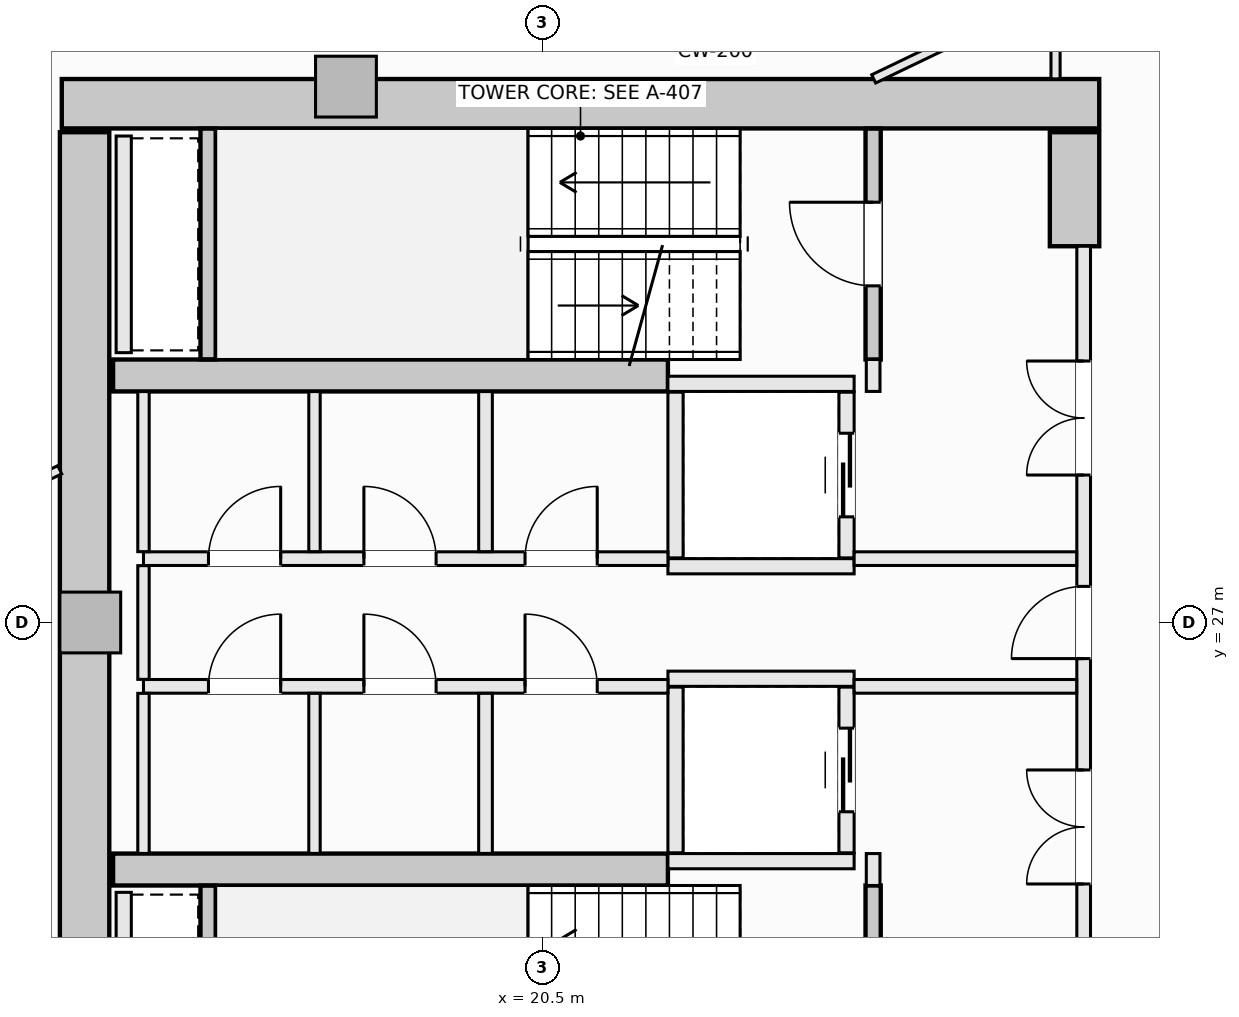
"""IFC4 building model, lengths in metres.
Left out: names, types, materials, properties, quantities, classifications, styles, units other than length and angle.
Written with IfcOpenShell. Run it as: python <this file> out.ifc"""

import sys

from ifc_helpers import new_model, si_unit, direction, frame, frame_2d, origin, origin_2d, place, context, subcontext, project, spatial, rectangle, extrude, element, fill, save


model = new_model("IFC4")
c1 = context("Model", 3, precision=1e-05, world=origin(), true_north=direction((0.0, 1.0)))
c2 = subcontext(c1, "Body", "Model", "MODEL_VIEW")
j1 = project(units=[si_unit("LENGTHUNIT", "METRE"), si_unit("PLANEANGLEUNIT", "RADIAN")], contexts=[c1])
p1 = place(None, origin())
s1 = spatial("IfcSite", under=j1, at=p1, CompositionType="ELEMENT")
p2 = place(p1, origin())
s2 = spatial("IfcBuilding", under=s1, at=p2, CompositionType="ELEMENT")
p3 = place(p2, frame((0.0, 0.0, 122.3)))
s3 = spatial("IfcBuildingStorey", under=s2, at=p3, CompositionType="ELEMENT", Elevation=122.3)
p4 = place(p3, frame((14.175, 33.825, -0.27), z_axis=(0.0, 0.0, 1.0), x_axis=(1.0, 0.0, 0.0)))
e1 = element("IfcWall", 1, at=p4, inside=s3, PredefinedType="SHEAR", context=c2, shape_type="SweptSolid", body=[
    extrude(rectangle(XDim=13.65, YDim=0.65, at=frame_2d((6.825, 0.0))), origin(), (0.0, 0.0, 1.0), 3.4),
])
p5 = place(p3, frame((14.475, 20.55, -0.27), z_axis=(0.0, 0.0, 1.0), x_axis=(0.0, 1.0, 0.0)))
e2 = element("IfcWall", 2, at=p5, inside=s3, PredefinedType="SHEAR", context=c2, shape_type="SweptSolid", body=[
    extrude(rectangle(XDim=12.9, YDim=0.65, at=frame_2d((6.45, 0.0))), origin(), (0.0, 0.0, 1.0), 3.4),
])
p6 = place(p3, frame((27.5, 31.95, -0.27), z_axis=(0.0, 0.0, 1.0), x_axis=(0.0, 1.0, 0.0)))
e3 = element("IfcWall", 3, at=p6, inside=s3, PredefinedType="SHEAR", context=c2, shape_type="SweptSolid", body=[
    extrude(rectangle(XDim=1.5, YDim=0.65, at=frame_2d((0.75, 0.0))), origin(), (0.0, 0.0, 1.0), 3.4),
])
for number, where, z_axis, x_axis in (
    (4, (14.85, 30.25, -0.27), (0.0, 0.0, 1.0), (1.0, 0.0, 0.0)),
    (5, (14.85, 23.75, -0.27), (0.0, 0.0, 1.0), (1.0, 0.0, 0.0)),
):
    element("IfcWall", number, at=place(p3, frame(where, z_axis=z_axis, x_axis=x_axis)), inside=s3, PredefinedType="SHEAR", context=c2, shape_type="SweptSolid", body=[
        extrude(rectangle(XDim=7.3, YDim=0.42, at=frame_2d((3.65, 0.0))), origin(), (0.0, 0.0, 1.0), 3.4),
    ])
for number, where, z_axis, x_axis in (
    (6, (17.914, 34.05, -0.27), (0.0, 0.0, 1.0), (1.0, 0.0, 0.0)),
    (7, (14.55, 27.0, -0.27), (0.0, 0.0, 1.0), (1.0, 0.0, 0.0)),
):
    element("IfcColumn", number, at=place(p3, frame(where, z_axis=z_axis, x_axis=x_axis)), inside=s3, PredefinedType="PILASTER", context=c2, shape_type="SweptSolid", body=[
        extrude(rectangle(XDim=0.8, YDim=0.8, at=origin_2d()), origin(), (0.0, 0.0, 1.0), 3.4),
    ])
p7 = place(p3, frame((24.85, 30.46, -0.27), z_axis=(0.0, 0.0, 1.0), x_axis=(0.0, 1.0, 0.0)))
e8 = element("IfcWall", 8, at=p7, inside=s3, PredefinedType="SHEAR", context=c2, shape_type="SweptSolid", body=[
    extrude(rectangle(XDim=3.038, YDim=0.2, at=frame_2d((1.519, 0.0))), origin(), (0.0, 0.0, 1.0), 3.4),
])
p8 = place(p7, frame((0.969, 0.0, 0.27)))
e9 = element("IfcOpeningElement", 9, at=p8, cuts=e8, PredefinedType="OPENING", context=c2, shape_type="SweptSolid", body=[
    extrude(rectangle(XDim=1.1, YDim=2.15, at=frame_2d((0.55, 1.075))), frame((0.0, 0.11, 0.0), z_axis=(0.0, -1.0, 0.0), x_axis=(1.0, 0.0, 0.0)), (0.0, 0.0, 1.0), 0.22),
])
p9 = place(p3, frame((16.1, 30.462, -0.27), z_axis=(0.0, 0.0, 1.0), x_axis=(0.0, 1.0, 0.0)))
e10 = element("IfcWall", 10, at=p9, inside=s3, PredefinedType="SHEAR", context=c2, shape_type="SweptSolid", body=[
    extrude(rectangle(XDim=3.036, YDim=0.2, at=frame_2d((1.518, 0.0))), origin(), (0.0, 0.0, 1.0), 3.4),
])
p10 = place(p3, frame((24.85, 20.502, -0.27), z_axis=(0.0, 0.0, 1.0), x_axis=(0.0, 1.0, 0.0)))
e11 = element("IfcWall", 11, at=p10, inside=s3, PredefinedType="SHEAR", context=c2, shape_type="SweptSolid", body=[
    extrude(rectangle(XDim=3.038, YDim=0.2, at=frame_2d((1.519, 0.0))), origin(), (0.0, 0.0, 1.0), 3.4),
])
p11 = place(p10, frame((0.969, 0.0, 0.27)))
e12 = element("IfcOpeningElement", 12, at=p11, cuts=e11, PredefinedType="OPENING", context=c2, shape_type="SweptSolid", body=[
    extrude(rectangle(XDim=1.1, YDim=2.15, at=frame_2d((0.55, 1.075))), frame((0.0, 0.11, 0.0), z_axis=(0.0, -1.0, 0.0), x_axis=(1.0, 0.0, 0.0)), (0.0, 0.0, 1.0), 0.22),
])
p12 = place(p3, frame((16.1, 20.502, -0.27), z_axis=(0.0, 0.0, 1.0), x_axis=(0.0, 1.0, 0.0)))
e13 = element("IfcWall", 13, at=p12, inside=s3, PredefinedType="SHEAR", context=c2, shape_type="SweptSolid", body=[
    extrude(rectangle(XDim=3.036, YDim=0.2, at=frame_2d((1.518, 0.0))), origin(), (0.0, 0.0, 1.0), 3.4),
])
for number, where, z_axis, x_axis in (
    (14, (22.15, 30.14, 0.0), (0.0, 0.0, 1.0), (1.0, 0.0, 0.0)),
    (15, (22.15, 27.74, 0.0), (0.0, 0.0, 1.0), (1.0, 0.0, 0.0)),
):
    element("IfcWall", number, at=place(p3, frame(where, z_axis=z_axis, x_axis=x_axis)), inside=s3, PredefinedType="SOLIDWALL", context=c2, shape_type="SweptSolid", body=[
        extrude(rectangle(XDim=2.45, YDim=0.2, at=frame_2d((1.225, 0.0))), origin(), (0.0, 0.0, 1.0), 3.13),
    ])
p13 = place(p3, frame((22.25, 27.85, 0.0), z_axis=(0.0, 0.0, 1.0), x_axis=(0.0, 1.0, 0.0)))
e16 = element("IfcWall", 16, at=p13, inside=s3, PredefinedType="SOLIDWALL", context=c2, shape_type="SweptSolid", body=[
    extrude(rectangle(XDim=2.18, YDim=0.2, at=frame_2d((1.09, 0.0))), origin(), (0.0, 0.0, 1.0), 3.13),
])
p14 = place(p3, frame((24.5, 27.85, 0.0), z_axis=(0.0, 0.0, 1.0), x_axis=(0.0, 1.0, 0.0)))
e17 = element("IfcWall", 17, at=p14, inside=s3, PredefinedType="SOLIDWALL", context=c2, shape_type="SweptSolid", body=[
    extrude(rectangle(XDim=2.18, YDim=0.2, at=frame_2d((1.09, 0.0))), origin(), (0.0, 0.0, 1.0), 3.13),
])
p15 = place(p14, frame((0.54, 0.0, 0.0)))
e18 = element("IfcOpeningElement", 18, at=p15, cuts=e17, PredefinedType="OPENING", context=c2, shape_type="SweptSolid", body=[
    extrude(rectangle(XDim=1.1, YDim=2.2, at=frame_2d((0.55, 1.1))), frame((0.0, 0.11, 0.0), z_axis=(0.0, -1.0, 0.0), x_axis=(1.0, 0.0, 0.0)), (0.0, 0.0, 1.0), 0.22),
])
for number, where, z_axis, x_axis in (
    (19, (22.15, 26.26, 0.0), (0.0, 0.0, 1.0), (1.0, 0.0, 0.0)),
    (20, (22.15, 23.86, 0.0), (0.0, 0.0, 1.0), (1.0, 0.0, 0.0)),
):
    element("IfcWall", number, at=place(p3, frame(where, z_axis=z_axis, x_axis=x_axis)), inside=s3, PredefinedType="SOLIDWALL", context=c2, shape_type="SweptSolid", body=[
        extrude(rectangle(XDim=2.45, YDim=0.2, at=frame_2d((1.225, 0.0))), origin(), (0.0, 0.0, 1.0), 3.13),
    ])
p16 = place(p3, frame((22.25, 23.97, 0.0), z_axis=(0.0, 0.0, 1.0), x_axis=(0.0, 1.0, 0.0)))
e21 = element("IfcWall", 21, at=p16, inside=s3, PredefinedType="SOLIDWALL", context=c2, shape_type="SweptSolid", body=[
    extrude(rectangle(XDim=2.18, YDim=0.2, at=frame_2d((1.09, 0.0))), origin(), (0.0, 0.0, 1.0), 3.13),
])
p17 = place(p3, frame((24.5, 23.97, 0.0), z_axis=(0.0, 0.0, 1.0), x_axis=(0.0, 1.0, 0.0)))
e22 = element("IfcWall", 22, at=p17, inside=s3, PredefinedType="SOLIDWALL", context=c2, shape_type="SweptSolid", body=[
    extrude(rectangle(XDim=2.18, YDim=0.2, at=frame_2d((1.09, 0.0))), origin(), (0.0, 0.0, 1.0), 3.13),
])
p18 = place(p17, frame((0.54, 0.0, 0.0)))
e23 = element("IfcOpeningElement", 23, at=p18, cuts=e22, PredefinedType="OPENING", context=c2, shape_type="SweptSolid", body=[
    extrude(rectangle(XDim=1.1, YDim=2.2, at=frame_2d((0.55, 1.1))), frame((0.0, 0.11, 0.0), z_axis=(0.0, -1.0, 0.0), x_axis=(1.0, 0.0, 0.0)), (0.0, 0.0, 1.0), 0.22),
])
for number, where, z_axis, x_axis in (
    (24, (14.99, 30.55, 0.0), (0.0, 0.0, 1.0), (0.0, 1.0, 0.0)),
    (25, (14.99, 20.6, 0.0), (0.0, 0.0, 1.0), (0.0, 1.0, 0.0)),
):
    element("IfcWall", number, at=place(p3, frame(where, z_axis=z_axis, x_axis=x_axis)), inside=s3, PredefinedType="SOLIDWALL", context=c2, shape_type="SweptSolid", body=[
        extrude(rectangle(XDim=2.85, YDim=0.2, at=frame_2d((1.425, 0.0))), origin(), (0.0, 0.0, 1.0), 3.13),
    ])
for number, where, z_axis, x_axis in (
    (26, (24.85, 23.54, 0.0), (0.0, 0.0, 1.0), (0.0, 1.0, 0.0)),
    (27, (24.85, 30.04, 0.0), (0.0, 0.0, 1.0), (0.0, 1.0, 0.0)),
):
    element("IfcWall", number, at=place(p3, frame(where, z_axis=z_axis, x_axis=x_axis)), inside=s3, PredefinedType="SOLIDWALL", context=c2, shape_type="SweptSolid", body=[
        extrude(rectangle(XDim=0.42, YDim=0.18, at=frame_2d((0.21, 0.0))), origin(), (0.0, 0.0, 1.0), 3.13),
    ])
p19 = place(p3, frame((27.62, 22.05, 0.0), z_axis=(0.0, 0.0, 1.0), x_axis=(0.0, 1.0, 0.0)))
e28 = element("IfcWall", 28, at=p19, inside=s3, PredefinedType="SOLIDWALL", context=c2, shape_type="SweptSolid", body=[
    extrude(rectangle(XDim=9.9, YDim=0.18, at=frame_2d((4.95, 0.0))), origin(), (0.0, 0.0, 1.0), 3.13),
])
p20 = place(p19, frame((4.475, 0.0, 0.0)))
e29 = element("IfcOpeningElement", 29, at=p20, cuts=e28, PredefinedType="OPENING", context=c2, shape_type="SweptSolid", body=[
    extrude(rectangle(XDim=0.95, YDim=2.1, at=frame_2d((0.475, 1.05))), frame((0.0, 0.1, 0.0), z_axis=(0.0, -1.0, 0.0), x_axis=(1.0, 0.0, 0.0)), (0.0, 0.0, 1.0), 0.2),
])
p21 = place(p19, frame((6.89, 0.0, 0.0)))
e30 = element("IfcOpeningElement", 30, at=p21, cuts=e28, PredefinedType="OPENING", context=c2, shape_type="SweptSolid", body=[
    extrude(rectangle(XDim=1.5, YDim=2.2, at=frame_2d((0.75, 1.1))), frame((0.0, 0.1, 0.0), z_axis=(0.0, -1.0, 0.0), x_axis=(1.0, 0.0, 0.0)), (0.0, 0.0, 1.0), 0.2),
])
p22 = place(p19, frame((1.51, 0.0, 0.0)))
e31 = element("IfcOpeningElement", 31, at=p22, cuts=e28, PredefinedType="OPENING", context=c2, shape_type="SweptSolid", body=[
    extrude(rectangle(XDim=1.5, YDim=2.2, at=frame_2d((0.75, 1.1))), frame((0.0, 0.1, 0.0), z_axis=(0.0, -1.0, 0.0), x_axis=(1.0, 0.0, 0.0)), (0.0, 0.0, 1.0), 0.2),
])
p23 = place(p3, frame((15.25, 27.84, 0.0), z_axis=(0.0, 0.0, 1.0), x_axis=(1.0, 0.0, 0.0)))
e32 = element("IfcWall", 32, at=p23, inside=s3, PredefinedType="SOLIDWALL", context=c2, shape_type="SweptSolid", body=[
    extrude(rectangle(XDim=6.9, YDim=0.18, at=frame_2d((3.45, 0.0))), origin(), (0.0, 0.0, 1.0), 3.13),
])
p24 = place(p23, frame((5.02, 0.0, 0.0)))
e33 = element("IfcOpeningElement", 33, at=p24, cuts=e32, PredefinedType="OPENING", context=c2, shape_type="SweptSolid", body=[
    extrude(rectangle(XDim=0.95, YDim=2.1, at=frame_2d((0.475, 1.05))), frame((0.0, 0.1, 0.0), z_axis=(0.0, -1.0, 0.0), x_axis=(1.0, 0.0, 0.0)), (0.0, 0.0, 1.0), 0.2),
])
p25 = place(p23, frame((0.855, 0.0, 0.0)))
e34 = element("IfcOpeningElement", 34, at=p25, cuts=e32, PredefinedType="OPENING", context=c2, shape_type="SweptSolid", body=[
    extrude(rectangle(XDim=0.95, YDim=2.1, at=frame_2d((0.475, 1.05))), frame((0.0, 0.1, 0.0), z_axis=(0.0, -1.0, 0.0), x_axis=(1.0, 0.0, 0.0)), (0.0, 0.0, 1.0), 0.2),
])
p26 = place(p23, frame((2.9, 0.0, 0.0)))
e35 = element("IfcOpeningElement", 35, at=p26, cuts=e32, PredefinedType="OPENING", context=c2, shape_type="SweptSolid", body=[
    extrude(rectangle(XDim=0.95, YDim=2.1, at=frame_2d((0.475, 1.05))), frame((0.0, 0.1, 0.0), z_axis=(0.0, -1.0, 0.0), x_axis=(1.0, 0.0, 0.0)), (0.0, 0.0, 1.0), 0.2),
])
p27 = place(p3, frame((24.6, 27.84, 0.0), z_axis=(0.0, 0.0, 1.0), x_axis=(1.0, 0.0, 0.0)))
e36 = element("IfcWall", 36, at=p27, inside=s3, PredefinedType="SOLIDWALL", context=c2, shape_type="SweptSolid", body=[
    extrude(rectangle(XDim=2.928, YDim=0.18, at=frame_2d((1.464, 0.0))), origin(), (0.0, 0.0, 1.0), 3.13),
])
p28 = place(p3, frame((15.25, 26.16, 0.0), z_axis=(0.0, 0.0, 1.0), x_axis=(1.0, 0.0, 0.0)))
e37 = element("IfcWall", 37, at=p28, inside=s3, PredefinedType="SOLIDWALL", context=c2, shape_type="SweptSolid", body=[
    extrude(rectangle(XDim=6.9, YDim=0.18, at=frame_2d((3.45, 0.0))), origin(), (0.0, 0.0, 1.0), 3.13),
])
p29 = place(p28, frame((5.02, 0.0, 0.0)))
e38 = element("IfcOpeningElement", 38, at=p29, cuts=e37, PredefinedType="OPENING", context=c2, shape_type="SweptSolid", body=[
    extrude(rectangle(XDim=0.95, YDim=2.1, at=frame_2d((0.475, 1.05))), frame((0.0, 0.1, 0.0), z_axis=(0.0, -1.0, 0.0), x_axis=(1.0, 0.0, 0.0)), (0.0, 0.0, 1.0), 0.2),
])
p30 = place(p28, frame((0.855, 0.0, 0.0)))
e39 = element("IfcOpeningElement", 39, at=p30, cuts=e37, PredefinedType="OPENING", context=c2, shape_type="SweptSolid", body=[
    extrude(rectangle(XDim=0.95, YDim=2.1, at=frame_2d((0.475, 1.05))), frame((0.0, 0.1, 0.0), z_axis=(0.0, -1.0, 0.0), x_axis=(1.0, 0.0, 0.0)), (0.0, 0.0, 1.0), 0.2),
])
p31 = place(p28, frame((2.9, 0.0, 0.0)))
e40 = element("IfcOpeningElement", 40, at=p31, cuts=e37, PredefinedType="OPENING", context=c2, shape_type="SweptSolid", body=[
    extrude(rectangle(XDim=0.95, YDim=2.1, at=frame_2d((0.475, 1.05))), frame((0.0, 0.1, 0.0), z_axis=(0.0, -1.0, 0.0), x_axis=(1.0, 0.0, 0.0)), (0.0, 0.0, 1.0), 0.2),
])
p32 = place(p3, frame((24.6, 26.16, 0.0), z_axis=(0.0, 0.0, 1.0), x_axis=(1.0, 0.0, 0.0)))
e41 = element("IfcWall", 41, at=p32, inside=s3, PredefinedType="SOLIDWALL", context=c2, shape_type="SweptSolid", body=[
    extrude(rectangle(XDim=2.928, YDim=0.18, at=frame_2d((1.464, 0.0))), origin(), (0.0, 0.0, 1.0), 3.13),
])
p33 = place(p3, frame((15.25, 23.962, 0.0), z_axis=(0.0, 0.0, 1.0), x_axis=(0.0, 1.0, 0.0)))
e42 = element("IfcWall", 42, at=p33, inside=s3, PredefinedType="PARTITIONING", context=c2, shape_type="SweptSolid", body=[
    extrude(rectangle(XDim=2.106, YDim=0.15, at=frame_2d((1.053, 0.0))), origin(), (0.0, 0.0, 1.0), 3.13),
])
p34 = place(p3, frame((15.25, 26.252, 0.0), z_axis=(0.0, 0.0, 1.0), x_axis=(0.0, 1.0, 0.0)))
e43 = element("IfcWall", 43, at=p34, inside=s3, PredefinedType="PARTITIONING", context=c2, shape_type="SweptSolid", body=[
    extrude(rectangle(XDim=1.496, YDim=0.15, at=frame_2d((0.748, 0.0))), origin(), (0.0, 0.0, 1.0), 3.13),
])
p35 = place(p3, frame((15.25, 27.932, 0.0), z_axis=(0.0, 0.0, 1.0), x_axis=(0.0, 1.0, 0.0)))
e44 = element("IfcWall", 44, at=p35, inside=s3, PredefinedType="PARTITIONING", context=c2, shape_type="SweptSolid", body=[
    extrude(rectangle(XDim=2.106, YDim=0.15, at=frame_2d((1.053, 0.0))), origin(), (0.0, 0.0, 1.0), 3.13),
])
for number, where, z_axis, x_axis in (
    (45, (19.75, 23.962, 0.0), (0.0, 0.0, 1.0), (0.0, 1.0, 0.0)),
    (46, (19.75, 27.932, 0.0), (0.0, 0.0, 1.0), (0.0, 1.0, 0.0)),
):
    element("IfcWall", number, at=place(p3, frame(where, z_axis=z_axis, x_axis=x_axis)), inside=s3, PredefinedType="SOLIDWALL", context=c2, shape_type="SweptSolid", body=[
        extrude(rectangle(XDim=2.106, YDim=0.18, at=frame_2d((1.053, 0.0))), origin(), (0.0, 0.0, 1.0), 3.13),
    ])
for number, where, z_axis, x_axis in (
    (47, (17.5, 23.962, 0.0), (0.0, 0.0, 1.0), (0.0, 1.0, 0.0)),
    (48, (17.5, 27.932, 0.0), (0.0, 0.0, 1.0), (0.0, 1.0, 0.0)),
):
    element("IfcWall", number, at=place(p3, frame(where, z_axis=z_axis, x_axis=x_axis)), inside=s3, PredefinedType="PARTITIONING", context=c2, shape_type="SweptSolid", body=[
        extrude(rectangle(XDim=2.106, YDim=0.15, at=frame_2d((1.053, 0.0))), origin(), (0.0, 0.0, 1.0), 3.13),
    ])
p36 = place(p3, frame((27.25, 34.152, 0.0), z_axis=(0.0, 0.0, 1.0), x_axis=(0.0, 1.0, 0.0)))
e49 = element("IfcWall", 49, at=p36, inside=s3, PredefinedType="PARTITIONING", context=c2, shape_type="SweptSolid", body=[
    extrude(rectangle(XDim=0.806, YDim=0.12, at=frame_2d((0.403, 0.0))), origin(), (0.0, 0.0, 1.0), 3.13),
])
p37 = place(p3, frame((6.375, 25.276, 0.0), z_axis=(0.0, 0.0, 1.0), x_axis=(0.901443069762, 0.432897669177, 0.0)))
e50 = element("IfcWall", 50, at=p37, inside=s3, PredefinedType="PARTITIONING", context=c2, shape_type="SweptSolid", body=[
    extrude(rectangle(XDim=8.623, YDim=0.12, at=frame_2d((4.311, 0.0))), origin(), (0.0, 0.0, 1.0), 2.505),
])
p38 = place(p3, frame((24.857, 34.152, 0.0), z_axis=(0.0, 0.0, 1.0), x_axis=(0.901471897781, 0.43283763412, 0.0)))
e51 = element("IfcWall", 51, at=p38, inside=s3, PredefinedType="PARTITIONING", context=c2, shape_type="SweptSolid", body=[
    extrude(rectangle(XDim=1.862, YDim=0.12, at=frame_2d((0.931, 0.0))), origin(), (0.0, 0.0, 1.0), 3.13),
])
p39 = place(p8, origin())
e52 = element("IfcDoor", 52, at=p39, inside=s3, OperationType="SINGLE_SWING_RIGHT", PredefinedType="DOOR", context=c2, shape_type="SweptSolid", body=[
    extrude(rectangle(XDim=1.1, YDim=2.15, at=frame_2d((0.55, 1.075))), frame((0.0, 0.025, 0.0), z_axis=(0.0, -1.0, 0.0), x_axis=(1.0, 0.0, 0.0)), (0.0, 0.0, 1.0), 0.05),
])
fill(e9, e52)
p40 = place(p15, origin())
e53 = element("IfcDoor", 53, at=p40, inside=s3, OperationType="SLIDING_TO_LEFT", PredefinedType="DOOR", context=c2, shape_type="SweptSolid", body=[
    extrude(rectangle(XDim=1.1, YDim=2.2, at=frame_2d((0.55, 1.1))), frame((0.0, 0.025, 0.0), z_axis=(0.0, -1.0, 0.0), x_axis=(1.0, 0.0, 0.0)), (0.0, 0.0, 1.0), 0.05),
])
fill(e18, e53)
p41 = place(p18, origin())
e54 = element("IfcDoor", 54, at=p41, inside=s3, OperationType="SLIDING_TO_LEFT", PredefinedType="DOOR", context=c2, shape_type="SweptSolid", body=[
    extrude(rectangle(XDim=1.1, YDim=2.2, at=frame_2d((0.55, 1.1))), frame((0.0, 0.025, 0.0), z_axis=(0.0, -1.0, 0.0), x_axis=(1.0, 0.0, 0.0)), (0.0, 0.0, 1.0), 0.05),
])
fill(e23, e54)
p42 = place(p20, origin())
e55 = element("IfcDoor", 55, at=p42, inside=s3, OperationType="SINGLE_SWING_LEFT", PredefinedType="DOOR", context=c2, shape_type="SweptSolid", body=[
    extrude(rectangle(XDim=0.95, YDim=2.1, at=frame_2d((0.475, 1.05))), frame((0.0, 0.025, 0.0), z_axis=(0.0, -1.0, 0.0), x_axis=(1.0, 0.0, 0.0)), (0.0, 0.0, 1.0), 0.05),
])
fill(e29, e55)
p43 = place(p21, origin())
e56 = element("IfcDoor", 56, at=p43, inside=s3, OperationType="DOUBLE_DOOR_SINGLE_SWING", PredefinedType="DOOR", context=c2, shape_type="SweptSolid", body=[
    extrude(rectangle(XDim=1.5, YDim=2.2, at=frame_2d((0.75, 1.1))), frame((0.0, 0.025, 0.0), z_axis=(0.0, -1.0, 0.0), x_axis=(1.0, 0.0, 0.0)), (0.0, 0.0, 1.0), 0.05),
])
fill(e30, e56)
p44 = place(p22, origin())
e57 = element("IfcDoor", 57, at=p44, inside=s3, OperationType="DOUBLE_DOOR_SINGLE_SWING", PredefinedType="DOOR", context=c2, shape_type="SweptSolid", body=[
    extrude(rectangle(XDim=1.5, YDim=2.2, at=frame_2d((0.75, 1.1))), frame((0.0, 0.025, 0.0), z_axis=(0.0, -1.0, 0.0), x_axis=(1.0, 0.0, 0.0)), (0.0, 0.0, 1.0), 0.05),
])
fill(e31, e57)
p45 = place(p24, origin())
e58 = element("IfcDoor", 58, at=p45, inside=s3, OperationType="SINGLE_SWING_RIGHT", PredefinedType="DOOR", context=c2, shape_type="SweptSolid", body=[
    extrude(rectangle(XDim=0.95, YDim=2.1, at=frame_2d((0.475, 1.05))), frame((0.0, 0.025, 0.0), z_axis=(0.0, -1.0, 0.0), x_axis=(1.0, 0.0, 0.0)), (0.0, 0.0, 1.0), 0.05),
])
fill(e33, e58)
p46 = place(p29, origin())
e59 = element("IfcDoor", 59, at=p46, inside=s3, OperationType="SINGLE_SWING_LEFT", PredefinedType="DOOR", context=c2, shape_type="SweptSolid", body=[
    extrude(rectangle(XDim=0.95, YDim=2.1, at=frame_2d((0.475, 1.05))), frame((0.0, 0.025, 0.0), z_axis=(0.0, -1.0, 0.0), x_axis=(1.0, 0.0, 0.0)), (0.0, 0.0, 1.0), 0.05),
])
fill(e38, e59)
p47 = place(p25, origin())
e60 = element("IfcDoor", 60, at=p47, inside=s3, OperationType="SINGLE_SWING_RIGHT", PredefinedType="DOOR", context=c2, shape_type="SweptSolid", body=[
    extrude(rectangle(XDim=0.95, YDim=2.1, at=frame_2d((0.475, 1.05))), frame((0.0, 0.025, 0.0), z_axis=(0.0, -1.0, 0.0), x_axis=(1.0, 0.0, 0.0)), (0.0, 0.0, 1.0), 0.05),
])
fill(e34, e60)
p48 = place(p26, origin())
e61 = element("IfcDoor", 61, at=p48, inside=s3, OperationType="SINGLE_SWING_LEFT", PredefinedType="DOOR", context=c2, shape_type="SweptSolid", body=[
    extrude(rectangle(XDim=0.95, YDim=2.1, at=frame_2d((0.475, 1.05))), frame((0.0, 0.025, 0.0), z_axis=(0.0, -1.0, 0.0), x_axis=(1.0, 0.0, 0.0)), (0.0, 0.0, 1.0), 0.05),
])
fill(e35, e61)
p49 = place(p30, origin())
e62 = element("IfcDoor", 62, at=p49, inside=s3, OperationType="SINGLE_SWING_RIGHT", PredefinedType="DOOR", context=c2, shape_type="SweptSolid", body=[
    extrude(rectangle(XDim=0.95, YDim=2.1, at=frame_2d((0.475, 1.05))), frame((0.0, 0.025, 0.0), z_axis=(0.0, -1.0, 0.0), x_axis=(1.0, 0.0, 0.0)), (0.0, 0.0, 1.0), 0.05),
])
fill(e39, e62)
p50 = place(p31, origin())
e63 = element("IfcDoor", 63, at=p50, inside=s3, OperationType="SINGLE_SWING_LEFT", PredefinedType="DOOR", context=c2, shape_type="SweptSolid", body=[
    extrude(rectangle(XDim=0.95, YDim=2.1, at=frame_2d((0.475, 1.05))), frame((0.0, 0.025, 0.0), z_axis=(0.0, -1.0, 0.0), x_axis=(1.0, 0.0, 0.0)), (0.0, 0.0, 1.0), 0.05),
])
fill(e40, e63)
save(model, sys.argv[1])
